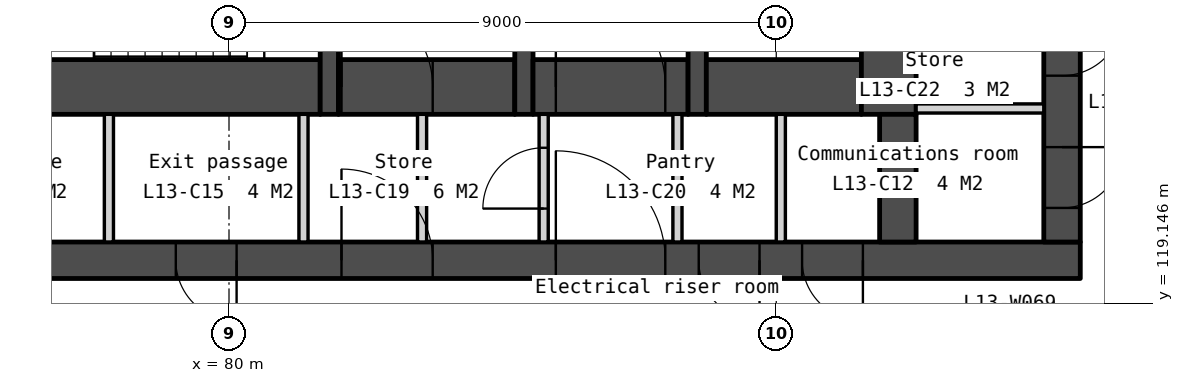
"""IFC4 building model, lengths in metres.
Left out: names, types, materials, properties, quantities, classifications, styles, units other than length and angle.
Written with IfcOpenShell. Run it as: python <this file> out.ifc"""

import sys

from ifc_helpers import new_model, si_unit, direction, frame, frame_2d, origin, place, context, subcontext, project, spatial, polyline, rectangle, outline, extrude, element, fill, save


model = new_model("IFC4")
c1 = context("Model", 3, precision=1e-05, world=origin(), true_north=direction((0.0, 1.0)))
c2 = subcontext(c1, "Body", "Model", "MODEL_VIEW")
j1 = project(units=[si_unit("LENGTHUNIT", "METRE"), si_unit("PLANEANGLEUNIT", "RADIAN")], contexts=[c1])
p1 = place(None, origin())
s1 = spatial("IfcSite", under=j1, at=p1, CompositionType="ELEMENT")
p2 = place(p1, origin())
s2 = spatial("IfcBuilding", under=s1, at=p2, CompositionType="ELEMENT")
p3 = place(p2, frame((0.0, 0.0, 59.5)))
s3 = spatial("IfcBuildingStorey", under=s2, at=p3, CompositionType="ELEMENT", Elevation=59.5)
p4 = place(p3, frame((66.0, 119.85, 0.0), z_axis=(0.0, 0.0, 1.0), x_axis=(1.0, 0.0, 0.0)))
e1 = element("IfcWall", 1, at=p4, inside=s3, PredefinedType="SOLIDWALL", context=c2, shape_type="SweptSolid", body=[
    extrude(rectangle(XDim=28.0, YDim=0.6, at=frame_2d((14.0, 0.0))), origin(), (0.0, 0.0, 1.0), 3.35),
])
p5 = place(p4, frame((6.825, 0.0, 0.0)))
e2 = element("IfcOpeningElement", 2, at=p5, cuts=e1, PredefinedType="OPENING", context=c2, shape_type="SweptSolid", body=[
    extrude(rectangle(XDim=1.8, YDim=2.1, at=frame_2d((0.9, 1.05))), frame((0.0, 0.31, 0.0), z_axis=(0.0, -1.0, 0.0), x_axis=(1.0, 0.0, 0.0)), (0.0, 0.0, 1.0), 0.62),
])
p6 = place(p4, frame((15.85, 0.0, 0.0)))
e3 = element("IfcOpeningElement", 3, at=p6, cuts=e1, PredefinedType="OPENING", context=c2, shape_type="SweptSolid", body=[
    extrude(rectangle(XDim=1.5, YDim=2.1, at=frame_2d((0.75, 1.05))), frame((0.0, 0.31, 0.0), z_axis=(0.0, -1.0, 0.0), x_axis=(1.0, 0.0, 0.0)), (0.0, 0.0, 1.0), 0.62),
])
p7 = place(p4, frame((19.375, 0.0, 0.0)))
e4 = element("IfcOpeningElement", 4, at=p7, cuts=e1, PredefinedType="OPENING", context=c2, shape_type="SweptSolid", body=[
    extrude(rectangle(XDim=1.8, YDim=2.1, at=frame_2d((0.9, 1.05))), frame((0.0, 0.31, 0.0), z_axis=(0.0, -1.0, 0.0), x_axis=(1.0, 0.0, 0.0)), (0.0, 0.0, 1.0), 0.62),
])
p8 = place(p4, frame((4.425, 0.0, 0.0)))
e5 = element("IfcOpeningElement", 5, at=p8, cuts=e1, PredefinedType="OPENING", context=c2, shape_type="SweptSolid", body=[
    extrude(rectangle(XDim=1.0, YDim=2.1, at=frame_2d((0.5, 1.05))), frame((0.0, 0.31, 0.0), z_axis=(0.0, -1.0, 0.0), x_axis=(1.0, 0.0, 0.0)), (0.0, 0.0, 1.0), 0.62),
])
p9 = place(p4, frame((9.925, 0.0, 0.0)))
e6 = element("IfcOpeningElement", 6, at=p9, cuts=e1, PredefinedType="OPENING", context=c2, shape_type="SweptSolid", body=[
    extrude(rectangle(XDim=1.0, YDim=2.1, at=frame_2d((0.5, 1.05))), frame((0.0, 0.31, 0.0), z_axis=(0.0, -1.0, 0.0), x_axis=(1.0, 0.0, 0.0)), (0.0, 0.0, 1.0), 0.62),
])
p10 = place(p4, frame((13.125, 0.0, 0.0)))
e7 = element("IfcOpeningElement", 7, at=p10, cuts=e1, PredefinedType="OPENING", context=c2, shape_type="SweptSolid", body=[
    extrude(rectangle(XDim=1.0, YDim=2.1, at=frame_2d((0.5, 1.05))), frame((0.0, 0.31, 0.0), z_axis=(0.0, -1.0, 0.0), x_axis=(1.0, 0.0, 0.0)), (0.0, 0.0, 1.0), 0.62),
])
p11 = place(p4, frame((21.725, 0.0, 0.0)))
e8 = element("IfcOpeningElement", 8, at=p11, cuts=e1, PredefinedType="OPENING", context=c2, shape_type="SweptSolid", body=[
    extrude(rectangle(XDim=1.0, YDim=2.1, at=frame_2d((0.5, 1.05))), frame((0.0, 0.31, 0.0), z_axis=(0.0, -1.0, 0.0), x_axis=(1.0, 0.0, 0.0)), (0.0, 0.0, 1.0), 0.62),
])
p12 = place(p4, frame((23.425, 0.0, 0.0)))
e9 = element("IfcOpeningElement", 9, at=p12, cuts=e1, PredefinedType="OPENING", context=c2, shape_type="SweptSolid", body=[
    extrude(rectangle(XDim=1.0, YDim=2.1, at=frame_2d((0.5, 1.05))), frame((0.0, 0.31, 0.0), z_axis=(0.0, -1.0, 0.0), x_axis=(1.0, 0.0, 0.0)), (0.0, 0.0, 1.0), 0.62),
])
p13 = place(p3, frame((75.3, 122.7, 0.0), z_axis=(0.0, 0.0, 1.0), x_axis=(1.0, 0.0, 0.0)))
e10 = element("IfcWall", 10, at=p13, inside=s3, PredefinedType="SOLIDWALL", context=c2, shape_type="SweptSolid", body=[
    extrude(rectangle(XDim=6.2, YDim=0.9, at=frame_2d((3.1, 0.0))), origin(), (0.0, 0.0, 1.0), 3.35),
])
for number, where, z_axis, x_axis in (
    (11, (78.025, 122.25, 0.0), (0.0, 0.0, 1.0), (0.0, -1.0, 0.0)),
    (12, (81.225, 122.25, 0.0), (0.0, 0.0, 1.0), (0.0, -1.0, 0.0)),
):
    element("IfcWall", number, at=place(p3, frame(where, z_axis=z_axis, x_axis=x_axis)), inside=s3, PredefinedType="PARTITIONING", context=c2, shape_type="SweptSolid", body=[
        extrude(rectangle(XDim=2.1, YDim=0.15, at=frame_2d((1.05, 0.0))), origin(), (0.0, 0.0, 1.0), 3.35),
    ])
p14 = place(p3, frame((81.65, 125.7, 0.0), z_axis=(0.0, 0.0, 1.0), x_axis=(0.0, -1.0, 0.0)))
e13 = element("IfcWall", 13, at=p14, inside=s3, PredefinedType="SOLIDWALL", context=c2, shape_type="SweptSolid", body=[
    extrude(rectangle(XDim=3.45, YDim=0.3, at=frame_2d((1.725, 0.0))), origin(), (0.0, 0.0, 1.0), 3.35),
])
p15 = place(p14, frame((0.75, 0.0, 0.0)))
e14 = element("IfcOpeningElement", 14, at=p15, cuts=e13, PredefinedType="OPENING", context=c2, shape_type="SweptSolid", body=[
    extrude(rectangle(XDim=1.0, YDim=2.1, at=frame_2d((0.5, 1.05))), frame((0.0, 0.16, 0.0), z_axis=(0.0, -1.0, 0.0), x_axis=(1.0, 0.0, 0.0)), (0.0, 0.0, 1.0), 0.32),
])
p16 = place(p3, frame((81.8, 122.7, 0.0), z_axis=(0.0, 0.0, 1.0), x_axis=(1.0, 0.0, 0.0)))
e15 = element("IfcWall", 15, at=p16, inside=s3, PredefinedType="SOLIDWALL", context=c2, shape_type="SweptSolid", body=[
    extrude(rectangle(XDim=2.9, YDim=0.9, at=frame_2d((1.45, 0.0))), origin(), (0.0, 0.0, 1.0), 3.35),
])
p17 = place(p16, frame((0.05, 0.0, 0.0)))
e16 = element("IfcOpeningElement", 16, at=p17, cuts=e15, PredefinedType="OPENING", context=c2, shape_type="SweptSolid", body=[
    extrude(rectangle(XDim=1.5, YDim=2.1, at=frame_2d((0.75, 1.05))), frame((0.0, 0.46, 0.0), z_axis=(0.0, -1.0, 0.0), x_axis=(1.0, 0.0, 0.0)), (0.0, 0.0, 1.0), 0.92),
])
p18 = place(p3, frame((83.175, 122.25, 0.0), z_axis=(0.0, 0.0, 1.0), x_axis=(0.0, -1.0, 0.0)))
e17 = element("IfcWall", 17, at=p18, inside=s3, PredefinedType="PARTITIONING", context=c2, shape_type="SweptSolid", body=[
    extrude(rectangle(XDim=2.1, YDim=0.15, at=frame_2d((1.05, 0.0))), origin(), (0.0, 0.0, 1.0), 3.35),
])
p19 = place(p3, frame((84.85, 133.95, 0.0), z_axis=(0.0, 0.0, 1.0), x_axis=(0.0, -1.0, 0.0)))
e18 = element("IfcWall", 18, at=p19, inside=s3, PredefinedType="SOLIDWALL", context=c2, shape_type="SweptSolid", body=[
    extrude(rectangle(XDim=11.7, YDim=0.3, at=frame_2d((5.85, 0.0))), origin(), (0.0, 0.0, 1.0), 3.35),
])
p20 = place(p3, frame((85.0, 122.7, 0.0), z_axis=(0.0, 0.0, 1.0), x_axis=(1.0, 0.0, 0.0)))
e19 = element("IfcWall", 19, at=p20, inside=s3, PredefinedType="SOLIDWALL", context=c2, shape_type="SweptSolid", body=[
    extrude(rectangle(XDim=2.55, YDim=0.9, at=frame_2d((1.275, 0.0))), origin(), (0.0, 0.0, 1.0), 3.35),
])
p21 = place(p20, frame((0.375, 0.0, 0.0)))
e20 = element("IfcOpeningElement", 20, at=p21, cuts=e19, PredefinedType="OPENING", context=c2, shape_type="SweptSolid", body=[
    extrude(rectangle(XDim=1.8, YDim=2.1, at=frame_2d((0.9, 1.05))), frame((0.0, 0.46, 0.0), z_axis=(0.0, -1.0, 0.0), x_axis=(1.0, 0.0, 0.0)), (0.0, 0.0, 1.0), 0.92),
])
p22 = place(p3, frame((85.175, 122.25, 0.0), z_axis=(0.0, 0.0, 1.0), x_axis=(0.0, -1.0, 0.0)))
e21 = element("IfcWall", 21, at=p22, inside=s3, PredefinedType="PARTITIONING", context=c2, shape_type="SweptSolid", body=[
    extrude(rectangle(XDim=2.1, YDim=0.15, at=frame_2d((1.05, 0.0))), origin(), (0.0, 0.0, 1.0), 3.35),
])
p23 = place(p22, frame((0.55, 0.0, 0.0)))
e22 = element("IfcOpeningElement", 22, at=p23, cuts=e21, PredefinedType="OPENING", context=c2, shape_type="SweptSolid", body=[
    extrude(rectangle(XDim=1.0, YDim=2.1, at=frame_2d((0.5, 1.05))), frame((0.0, 0.085, 0.0), z_axis=(0.0, -1.0, 0.0), x_axis=(1.0, 0.0, 0.0)), (0.0, 0.0, 1.0), 0.17),
])
p24 = place(p3, frame((87.375, 122.25, 0.0), z_axis=(0.0, 0.0, 1.0), x_axis=(0.0, -1.0, 0.0)))
e23 = element("IfcWall", 23, at=p24, inside=s3, PredefinedType="PARTITIONING", context=c2, shape_type="SweptSolid", body=[
    extrude(rectangle(XDim=2.1, YDim=0.15, at=frame_2d((1.05, 0.0))), origin(), (0.0, 0.0, 1.0), 3.35),
])
p25 = place(p3, frame((87.7, 133.95, 0.0), z_axis=(0.0, 0.0, 1.0), x_axis=(0.0, -1.0, 0.0)))
e24 = element("IfcWall", 24, at=p25, inside=s3, PredefinedType="SOLIDWALL", context=c2, shape_type="SweptSolid", body=[
    extrude(rectangle(XDim=11.7, YDim=0.3, at=frame_2d((5.85, 0.0))), origin(), (0.0, 0.0, 1.0), 3.35),
])
p26 = place(p25, frame((6.95, 0.0, 0.0)))
e25 = element("IfcOpeningElement", 25, at=p26, cuts=e24, PredefinedType="OPENING", context=c2, shape_type="SweptSolid", body=[
    extrude(rectangle(XDim=1.1, YDim=2.1, at=frame_2d((0.55, 1.05))), frame((0.0, 0.16, 0.0), z_axis=(0.0, -1.0, 0.0), x_axis=(1.0, 0.0, 0.0)), (0.0, 0.0, 1.0), 0.32),
])
p27 = place(p25, frame((5.1, 0.0, 0.0)))
e26 = element("IfcOpeningElement", 26, at=p27, cuts=e24, PredefinedType="OPENING", context=c2, shape_type="SweptSolid", body=[
    extrude(rectangle(XDim=1.0, YDim=2.1, at=frame_2d((0.5, 1.05))), frame((0.0, 0.16, 0.0), z_axis=(0.0, -1.0, 0.0), x_axis=(1.0, 0.0, 0.0)), (0.0, 0.0, 1.0), 0.32),
])
p28 = place(p25, frame((9.25, 0.0, 0.0)))
e27 = element("IfcOpeningElement", 27, at=p28, cuts=e24, PredefinedType="OPENING", context=c2, shape_type="SweptSolid", body=[
    extrude(rectangle(XDim=1.1, YDim=2.1, at=frame_2d((0.55, 1.05))), frame((0.0, 0.16, 0.0), z_axis=(0.0, -1.0, 0.0), x_axis=(1.0, 0.0, 0.0)), (0.0, 0.0, 1.0), 0.32),
])
p29 = place(p3, frame((87.85, 122.7, 0.0), z_axis=(0.0, 0.0, 1.0), x_axis=(1.0, 0.0, 0.0)))
e28 = element("IfcWall", 28, at=p29, inside=s3, PredefinedType="SOLIDWALL", context=c2, shape_type="SweptSolid", body=[
    extrude(rectangle(XDim=2.55, YDim=0.9, at=frame_2d((1.275, 0.0))), origin(), (0.0, 0.0, 1.0), 3.35),
])
p30 = place(p3, frame((89.075, 122.25, 0.0), z_axis=(0.0, 0.0, 1.0), x_axis=(0.0, -1.0, 0.0)))
e29 = element("IfcWall", 29, at=p30, inside=s3, PredefinedType="PARTITIONING", context=c2, shape_type="SweptSolid", body=[
    extrude(rectangle(XDim=2.1, YDim=0.15, at=frame_2d((1.05, 0.0))), origin(), (0.0, 0.0, 1.0), 3.35),
])
p31 = place(p3, frame((90.85, 133.95, 0.0), z_axis=(0.0, 0.0, 1.0), x_axis=(0.0, -1.0, 0.0)))
e30 = element("IfcWall", 30, at=p31, inside=s3, PredefinedType="SOLIDWALL", context=c2, shape_type="SweptSolid", body=[
    extrude(rectangle(XDim=11.7, YDim=0.9, at=frame_2d((5.85, 0.0))), origin(), (0.0, 0.0, 1.0), 3.35),
])
p32 = place(p3, frame((91.0, 122.25, 0.0), z_axis=(0.0, 0.0, 1.0), x_axis=(0.0, -1.0, 0.0)))
e31 = element("IfcWall", 31, at=p32, inside=s3, PredefinedType="SOLIDWALL", context=c2, shape_type="SweptSolid", body=[
    extrude(rectangle(XDim=2.1, YDim=0.6, at=frame_2d((1.05, 0.0))), origin(), (0.0, 0.0, 1.0), 3.35),
])
p33 = place(p3, frame((91.3, 122.346, 0.0), z_axis=(0.0, 0.0, 1.0), x_axis=(1.0, 0.0, 0.0)))
e32 = element("IfcWall", 32, at=p33, inside=s3, PredefinedType="PARTITIONING", context=c2, shape_type="SweptSolid", body=[
    extrude(rectangle(XDim=2.1, YDim=0.15, at=frame_2d((1.05, 0.0))), origin(), (0.0, 0.0, 1.0), 3.35),
])
p34 = place(p3, frame((93.7, 133.95, 0.0), z_axis=(0.0, 0.0, 1.0), x_axis=(0.0, -1.0, 0.0)))
e33 = element("IfcWall", 33, at=p34, inside=s3, PredefinedType="SOLIDWALL", context=c2, shape_type="SweptSolid", body=[
    extrude(rectangle(XDim=13.8, YDim=0.6, at=frame_2d((6.9, 0.0))), origin(), (0.0, 0.0, 1.0), 3.35),
])
p35 = place(p34, frame((0.6, 0.0, 0.0)))
e34 = element("IfcOpeningElement", 34, at=p35, cuts=e33, PredefinedType="OPENING", context=c2, shape_type="SweptSolid", body=[
    extrude(rectangle(XDim=1.1, YDim=2.1, at=frame_2d((0.55, 1.05))), frame((0.0, 0.31, 0.0), z_axis=(0.0, -1.0, 0.0), x_axis=(1.0, 0.0, 0.0)), (0.0, 0.0, 1.0), 0.62),
])
p36 = place(p34, frame((10.064, 0.0, 0.0)))
e35 = element("IfcOpeningElement", 35, at=p36, cuts=e33, PredefinedType="OPENING", context=c2, shape_type="SweptSolid", body=[
    extrude(rectangle(XDim=1.0, YDim=2.1, at=frame_2d((0.5, 1.05))), frame((0.0, 0.31, 0.0), z_axis=(0.0, -1.0, 0.0), x_axis=(1.0, 0.0, 0.0)), (0.0, 0.0, 1.0), 0.62),
])
p37 = place(p34, frame((8.35, 0.0, 0.0)))
e36 = element("IfcOpeningElement", 36, at=p37, cuts=e33, PredefinedType="OPENING", context=c2, shape_type="SweptSolid", body=[
    extrude(rectangle(XDim=0.85, YDim=2.1, at=frame_2d((0.425, 1.05))), frame((0.0, 0.31, 0.0), z_axis=(0.0, -1.0, 0.0), x_axis=(1.0, 0.0, 0.0)), (0.0, 0.0, 1.0), 0.62),
])
p38 = place(p34, frame((12.239, 0.0, 0.0)))
e37 = element("IfcOpeningElement", 37, at=p38, cuts=e33, PredefinedType="OPENING", context=c2, shape_type="SweptSolid", body=[
    extrude(rectangle(XDim=1.0, YDim=2.1, at=frame_2d((0.5, 1.05))), frame((0.0, 0.31, 0.0), z_axis=(0.0, -1.0, 0.0), x_axis=(1.0, 0.0, 0.0)), (0.0, 0.0, 1.0), 0.62),
])
p39 = place(p3, frame((83.105, 90.599, -0.15), z_axis=(0.0, 0.0, 1.0), x_axis=(0.499999201451, 0.866025864826, 0.0)))
e38 = element("IfcWall", 38, at=p39, inside=s3, PredefinedType="SOLIDWALL", context=c2, shape_type="SweptSolid", body=[
    extrude(outline(polyline([(44.8, 0.0), (44.8, 3.5), (0.0, 3.5), (0.0, 0.0), (44.8, 0.0)])), frame((0.0, 0.225, 0.0), z_axis=(0.0, -1.0, 0.0), x_axis=(1.0, 0.0, 0.0)), (0.0, 0.0, 1.0), 0.45),
])
p40 = place(p39, frame((3.03, 0.0, 1.05)))
e39 = element("IfcOpeningElement", 39, at=p40, cuts=e38, PredefinedType="OPENING", context=c2, shape_type="SweptSolid", body=[
    extrude(rectangle(XDim=1.2, YDim=1.5, at=frame_2d((0.6, 0.75))), frame((0.0, 0.235, 0.0), z_axis=(0.0, -1.0, 0.0), x_axis=(1.0, 0.0, 0.0)), (0.0, 0.0, 1.0), 0.47),
])
p41 = place(p39, frame((4.73, 0.0, 1.05)))
e40 = element("IfcOpeningElement", 40, at=p41, cuts=e38, PredefinedType="OPENING", context=c2, shape_type="SweptSolid", body=[
    extrude(rectangle(XDim=1.2, YDim=1.5, at=frame_2d((0.6, 0.75))), frame((0.0, 0.235, 0.0), z_axis=(0.0, -1.0, 0.0), x_axis=(1.0, 0.0, 0.0)), (0.0, 0.0, 1.0), 0.47),
])
p42 = place(p39, frame((11.99, 0.0, 1.05)))
e41 = element("IfcOpeningElement", 41, at=p42, cuts=e38, PredefinedType="OPENING", context=c2, shape_type="SweptSolid", body=[
    extrude(rectangle(XDim=1.2, YDim=1.5, at=frame_2d((0.6, 0.75))), frame((0.0, 0.235, 0.0), z_axis=(0.0, -1.0, 0.0), x_axis=(1.0, 0.0, 0.0)), (0.0, 0.0, 1.0), 0.47),
])
p43 = place(p39, frame((13.69, 0.0, 1.05)))
e42 = element("IfcOpeningElement", 42, at=p43, cuts=e38, PredefinedType="OPENING", context=c2, shape_type="SweptSolid", body=[
    extrude(rectangle(XDim=1.2, YDim=1.5, at=frame_2d((0.6, 0.75))), frame((0.0, 0.235, 0.0), z_axis=(0.0, -1.0, 0.0), x_axis=(1.0, 0.0, 0.0)), (0.0, 0.0, 1.0), 0.47),
])
p44 = place(p39, frame((20.95, 0.0, 1.05)))
e43 = element("IfcOpeningElement", 43, at=p44, cuts=e38, PredefinedType="OPENING", context=c2, shape_type="SweptSolid", body=[
    extrude(rectangle(XDim=1.2, YDim=1.5, at=frame_2d((0.6, 0.75))), frame((0.0, 0.235, 0.0), z_axis=(0.0, -1.0, 0.0), x_axis=(1.0, 0.0, 0.0)), (0.0, 0.0, 1.0), 0.47),
])
p45 = place(p39, frame((22.65, 0.0, 1.05)))
e44 = element("IfcOpeningElement", 44, at=p45, cuts=e38, PredefinedType="OPENING", context=c2, shape_type="SweptSolid", body=[
    extrude(rectangle(XDim=1.2, YDim=1.5, at=frame_2d((0.6, 0.75))), frame((0.0, 0.235, 0.0), z_axis=(0.0, -1.0, 0.0), x_axis=(1.0, 0.0, 0.0)), (0.0, 0.0, 1.0), 0.47),
])
p46 = place(p39, frame((29.91, 0.0, 1.05)))
e45 = element("IfcOpeningElement", 45, at=p46, cuts=e38, PredefinedType="OPENING", context=c2, shape_type="SweptSolid", body=[
    extrude(rectangle(XDim=1.2, YDim=1.5, at=frame_2d((0.6, 0.75))), frame((0.0, 0.235, 0.0), z_axis=(0.0, -1.0, 0.0), x_axis=(1.0, 0.0, 0.0)), (0.0, 0.0, 1.0), 0.47),
])
p47 = place(p39, frame((31.61, 0.0, 1.05)))
e46 = element("IfcOpeningElement", 46, at=p47, cuts=e38, PredefinedType="OPENING", context=c2, shape_type="SweptSolid", body=[
    extrude(rectangle(XDim=1.2, YDim=1.5, at=frame_2d((0.6, 0.75))), frame((0.0, 0.235, 0.0), z_axis=(0.0, -1.0, 0.0), x_axis=(1.0, 0.0, 0.0)), (0.0, 0.0, 1.0), 0.47),
])
p48 = place(p39, frame((38.87, 0.0, 1.05)))
e47 = element("IfcOpeningElement", 47, at=p48, cuts=e38, PredefinedType="OPENING", context=c2, shape_type="SweptSolid", body=[
    extrude(rectangle(XDim=1.2, YDim=1.5, at=frame_2d((0.6, 0.75))), frame((0.0, 0.235, 0.0), z_axis=(0.0, -1.0, 0.0), x_axis=(1.0, 0.0, 0.0)), (0.0, 0.0, 1.0), 0.47),
])
p49 = place(p39, frame((40.57, 0.0, 1.05)))
e48 = element("IfcOpeningElement", 48, at=p49, cuts=e38, PredefinedType="OPENING", context=c2, shape_type="SweptSolid", body=[
    extrude(rectangle(XDim=1.2, YDim=1.5, at=frame_2d((0.6, 0.75))), frame((0.0, 0.235, 0.0), z_axis=(0.0, -1.0, 0.0), x_axis=(1.0, 0.0, 0.0)), (0.0, 0.0, 1.0), 0.47),
])
p50 = place(p36, origin())
e49 = element("IfcDoor", 49, at=p50, inside=s3, OperationType="SINGLE_SWING_LEFT", PredefinedType="DOOR", context=c2, shape_type="SweptSolid", body=[
    extrude(rectangle(XDim=1.0, YDim=2.1, at=frame_2d((0.5, 1.05))), frame((0.0, 0.025, 0.0), z_axis=(0.0, -1.0, 0.0), x_axis=(1.0, 0.0, 0.0)), (0.0, 0.0, 1.0), 0.05),
])
fill(e35, e49)
p51 = place(p38, origin())
e50 = element("IfcDoor", 50, at=p51, inside=s3, OperationType="SINGLE_SWING_LEFT", PredefinedType="DOOR", context=c2, shape_type="SweptSolid", body=[
    extrude(rectangle(XDim=1.0, YDim=2.1, at=frame_2d((0.5, 1.05))), frame((0.0, 0.025, 0.0), z_axis=(0.0, -1.0, 0.0), x_axis=(1.0, 0.0, 0.0)), (0.0, 0.0, 1.0), 0.05),
])
fill(e37, e50)
p52 = place(p21, origin())
e51 = element("IfcDoor", 51, at=p52, inside=s3, OperationType="DOUBLE_DOOR_DOUBLE_SWING", PredefinedType="DOOR", context=c2, shape_type="SweptSolid", body=[
    extrude(rectangle(XDim=1.8, YDim=2.1, at=frame_2d((0.9, 1.05))), frame((0.0, 0.025, 0.0), z_axis=(0.0, -1.0, 0.0), x_axis=(1.0, 0.0, 0.0)), (0.0, 0.0, 1.0), 0.05),
])
fill(e20, e51)
p53 = place(p17, origin())
e52 = element("IfcDoor", 52, at=p53, inside=s3, OperationType="DOUBLE_DOOR_DOUBLE_SWING", PredefinedType="DOOR", context=c2, shape_type="SweptSolid", body=[
    extrude(rectangle(XDim=1.5, YDim=2.1, at=frame_2d((0.75, 1.05))), frame((0.0, 0.025, 0.0), z_axis=(0.0, -1.0, 0.0), x_axis=(1.0, 0.0, 0.0)), (0.0, 0.0, 1.0), 0.05),
])
fill(e16, e52)
p54 = place(p6, origin())
e53 = element("IfcDoor", 53, at=p54, inside=s3, OperationType="DOUBLE_DOOR_DOUBLE_SWING", PredefinedType="DOOR", context=c2, shape_type="SweptSolid", body=[
    extrude(rectangle(XDim=1.5, YDim=2.1, at=frame_2d((0.75, 1.05))), frame((0.0, 0.025, 0.0), z_axis=(0.0, -1.0, 0.0), x_axis=(1.0, 0.0, 0.0)), (0.0, 0.0, 1.0), 0.05),
])
fill(e3, e53)
p55 = place(p7, origin())
e54 = element("IfcDoor", 54, at=p55, inside=s3, OperationType="DOUBLE_DOOR_DOUBLE_SWING", PredefinedType="DOOR", context=c2, shape_type="SweptSolid", body=[
    extrude(rectangle(XDim=1.8, YDim=2.1, at=frame_2d((0.9, 1.05))), frame((0.0, 0.025, 0.0), z_axis=(0.0, -1.0, 0.0), x_axis=(1.0, 0.0, 0.0)), (0.0, 0.0, 1.0), 0.05),
])
fill(e4, e54)
p56 = place(p10, origin())
e55 = element("IfcDoor", 55, at=p56, inside=s3, OperationType="SINGLE_SWING_RIGHT", PredefinedType="DOOR", context=c2, shape_type="SweptSolid", body=[
    extrude(rectangle(XDim=1.0, YDim=2.1, at=frame_2d((0.5, 1.05))), frame((0.0, 0.025, 0.0), z_axis=(0.0, -1.0, 0.0), x_axis=(1.0, 0.0, 0.0)), (0.0, 0.0, 1.0), 0.05),
])
fill(e7, e55)
p57 = place(p23, origin())
e56 = element("IfcDoor", 56, at=p57, inside=s3, OperationType="SINGLE_SWING_RIGHT", PredefinedType="DOOR", context=c2, shape_type="SweptSolid", body=[
    extrude(rectangle(XDim=1.0, YDim=2.1, at=frame_2d((0.5, 1.05))), frame((0.0, 0.025, 0.0), z_axis=(0.0, -1.0, 0.0), x_axis=(1.0, 0.0, 0.0)), (0.0, 0.0, 1.0), 0.05),
])
fill(e22, e56)
p58 = place(p11, origin())
e57 = element("IfcDoor", 57, at=p58, inside=s3, OperationType="SINGLE_SWING_RIGHT", PredefinedType="DOOR", context=c2, shape_type="SweptSolid", body=[
    extrude(rectangle(XDim=1.0, YDim=2.1, at=frame_2d((0.5, 1.05))), frame((0.0, 0.025, 0.0), z_axis=(0.0, -1.0, 0.0), x_axis=(1.0, 0.0, 0.0)), (0.0, 0.0, 1.0), 0.05),
])
fill(e8, e57)
p59 = place(p12, origin())
e58 = element("IfcDoor", 58, at=p59, inside=s3, OperationType="SINGLE_SWING_RIGHT", PredefinedType="DOOR", context=c2, shape_type="SweptSolid", body=[
    extrude(rectangle(XDim=1.0, YDim=2.1, at=frame_2d((0.5, 1.05))), frame((0.0, 0.025, 0.0), z_axis=(0.0, -1.0, 0.0), x_axis=(1.0, 0.0, 0.0)), (0.0, 0.0, 1.0), 0.05),
])
fill(e9, e58)
save(model, sys.argv[1])
